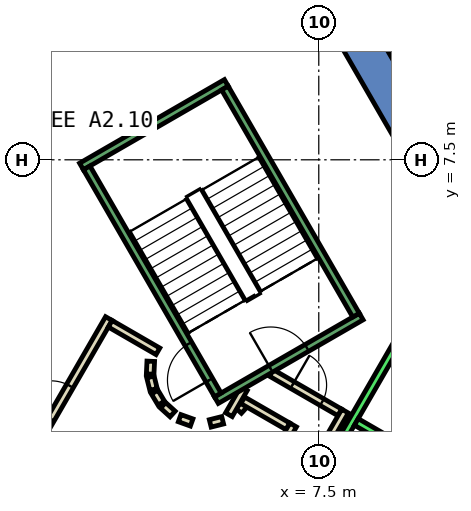
"""IFC4 building model, lengths in metres.
Left out: names, types, materials, properties, quantities, classifications, styles, units other than length and angle.
Written with IfcOpenShell. Run it as: python <this file> out.ifc"""

import sys

from ifc_helpers import new_model, si_unit, direction, frame, frame_2d, origin, place, context, subcontext, project, spatial, polyline, rectangle, outline, extrude, element, fill, save


model = new_model("IFC4")
c1 = context("Model", 3, precision=1e-05, world=origin(), true_north=direction((0.0, 1.0)))
c2 = subcontext(c1, "Body", "Model", "MODEL_VIEW")
j1 = project(units=[si_unit("LENGTHUNIT", "METRE"), si_unit("PLANEANGLEUNIT", "RADIAN")], contexts=[c1])
p1 = place(None, origin())
s1 = spatial("IfcSite", under=j1, at=p1, CompositionType="ELEMENT")
p2 = place(p1, origin())
s2 = spatial("IfcBuilding", under=s1, at=p2, CompositionType="ELEMENT")
p3 = place(p2, frame((0.0, 0.0, 35.0)))
s3 = spatial("IfcBuildingStorey", under=s2, at=p3, CompositionType="ELEMENT", Elevation=35.0)
p4 = place(p3, frame((0.0, 0.0, -0.6)))
e1 = element("IfcWall", 1, at=p4, inside=s3, PredefinedType="SHEAR", context=c2, shape_type="SweptSolid", body=[
    extrude(outline(polyline([(8.517, 11.748), (7.651, 11.248), (12.702, 2.5), (13.856, 2.5), (8.517, 11.748)])), origin(), (0.0, 0.0, 1.0), 4.4),
])
p5 = place(p3, frame((5.39, 0.898, 0.0), z_axis=(0.0, 0.0, 1.0), x_axis=(0.673828488714, 0.738887791073, 0.0)))
e2 = element("IfcWall", 2, at=p5, inside=s3, PredefinedType="PARTITIONING", context=c2, shape_type="SweptSolid", body=[
    extrude(rectangle(XDim=0.263, YDim=0.2, at=frame_2d((0.131, 0.0))), origin(), (0.0, 0.0, 1.0), 3.8),
])
p6 = place(p3, frame((5.499, 1.172, 0.0), z_axis=(0.0, 0.0, 1.0), x_axis=(0.866333505267, -0.499465972466, 0.0)))
e3 = element("IfcWall", 3, at=p6, inside=s3, PredefinedType="PARTITIONING", context=c2, shape_type="SweptSolid", body=[
    extrude(rectangle(XDim=1.374, YDim=0.2, at=frame_2d((0.687, 0.0))), origin(), (0.0, 0.0, 1.0), 3.8),
])
p7 = place(p3, frame((6.826, 0.522, 0.0), z_axis=(0.0, 0.0, 1.0), x_axis=(-0.500016722714, -0.866015748706, 0.0)))
e4 = element("IfcWall", 4, at=p7, inside=s3, PredefinedType="PARTITIONING", context=c2, shape_type="SweptSolid", body=[
    extrude(rectangle(XDim=1.7, YDim=0.2, at=frame_2d((0.85, 0.0))), origin(), (0.0, 0.0, 1.0), 3.8),
])
p8 = place(p3, frame((6.25, 1.894, 0.0), z_axis=(0.0, 0.0, 1.0), x_axis=(0.866043184279, -0.499969202016, 0.0)))
e5 = element("IfcWall", 5, at=p8, inside=s3, PredefinedType="PARTITIONING", context=c2, shape_type="SweptSolid", body=[
    extrude(rectangle(XDim=2.084, YDim=0.2, at=frame_2d((1.042, 0.0))), origin(), (0.0, 0.0, 1.0), 3.8),
])
p9 = place(p8, frame((0.642, 0.0, 0.0)))
e6 = element("IfcOpeningElement", 6, at=p9, cuts=e5, PredefinedType="OPENING", context=c2, shape_type="SweptSolid", body=[
    extrude(rectangle(XDim=0.9, YDim=2.1, at=frame_2d((0.45, 1.05))), frame((0.0, 0.11, 0.0), z_axis=(0.0, -1.0, 0.0), x_axis=(1.0, 0.0, 0.0)), (0.0, 0.0, 1.0), 0.22),
])
p10 = place(p3, frame((8.192, 0.888, 0.0), z_axis=(0.0, 0.0, 1.0), x_axis=(-0.499940625693, -0.866059680843, 0.0)))
e7 = element("IfcWall", 7, at=p10, inside=s3, PredefinedType="PARTITIONING", context=c2, shape_type="SweptSolid", body=[
    extrude(rectangle(XDim=2.68, YDim=0.2, at=frame_2d((1.34, 0.0))), origin(), (0.0, 0.0, 1.0), 3.8),
])
p11 = place(p3, frame((5.135, 0.793, 0.0), z_axis=(0.0, 0.0, 1.0), x_axis=(0.499526442893, 0.866298639529, 0.0)))
e8 = element("IfcWall", 8, at=p11, inside=s3, PredefinedType="PARTITIONING", context=c2, shape_type="SweptSolid", body=[
    extrude(rectangle(XDim=0.791, YDim=0.2, at=frame_2d((0.396, 0.0))), origin(), (0.0, 0.0, 1.0), 3.8),
])
p12 = place(p3, frame((-0.52, -1.0, 0.0), z_axis=(0.0, 0.0, 1.0), x_axis=(0.50011622646, 0.865958290007, 0.0)))
e9 = element("IfcWall", 9, at=p12, inside=s3, PredefinedType="PARTITIONING", context=c2, shape_type="SweptSolid", body=[
    extrude(rectangle(XDim=4.991, YDim=0.2, at=frame_2d((2.496, 0.0))), origin(), (0.0, 0.0, 1.0), 3.8),
])
p13 = place(p12, frame((1.945, 0.0, 0.0)))
e10 = element("IfcOpeningElement", 10, at=p13, cuts=e9, PredefinedType="OPENING", context=c2, shape_type="SweptSolid", body=[
    extrude(rectangle(XDim=1.0, YDim=2.1, at=frame_2d((0.5, 1.05))), frame((0.0, 0.11, 0.0), z_axis=(0.0, -1.0, 0.0), x_axis=(1.0, 0.0, 0.0)), (0.0, 0.0, 1.0), 0.22),
])
p14 = place(p3, frame((2.012, 3.186, 0.0), z_axis=(0.0, 0.0, 1.0), x_axis=(0.865891012941, -0.500232699559, 0.0)))
e11 = element("IfcWall", 11, at=p14, inside=s3, PredefinedType="PARTITIONING", context=c2, shape_type="SweptSolid", body=[
    extrude(rectangle(XDim=1.449, YDim=0.2, at=frame_2d((0.725, 0.0))), origin(), (0.0, 0.0, 1.0), 3.8),
])
p15 = place(p3, frame((3.079, 2.199, 0.0), z_axis=(0.0, 0.0, 1.0), x_axis=(-0.047771483479, -0.998858290933, 0.0)))
e12 = element("IfcWall", 12, at=p15, inside=s3, PredefinedType="PARTITIONING", context=c2, shape_type="SweptSolid", body=[
    extrude(rectangle(XDim=0.337, YDim=0.2, at=frame_2d((0.169, 0.0))), origin(), (0.0, 0.0, 1.0), 3.8),
])
p16 = place(p3, frame((3.07, 1.786, 0.0), z_axis=(0.0, 0.0, 1.0), x_axis=(0.242705583207, -0.970099994784, 0.0)))
e13 = element("IfcWall", 13, at=p16, inside=s3, PredefinedType="PARTITIONING", context=c2, shape_type="SweptSolid", body=[
    extrude(rectangle(XDim=0.338, YDim=0.2, at=frame_2d((0.169, 0.0))), origin(), (0.0, 0.0, 1.0), 3.8),
])
for number, where, z_axis, x_axis in (
    (14, (3.182, 1.388, 0.0), (0.0, 0.0, 1.0), (0.512, -0.859, 0.0)),
    (15, (3.404, 1.039, 0.0), (0.0, 0.0, 1.0), (0.74, -0.672, 0.0)),
):
    element("IfcWall", number, at=place(p3, frame(where, z_axis=z_axis, x_axis=x_axis)), inside=s3, PredefinedType="PARTITIONING", context=c2, shape_type="SweptSolid", body=[
        extrude(rectangle(XDim=0.338, YDim=0.2, at=frame_2d((0.169, 0.0))), origin(), (0.0, 0.0, 1.0), 3.8),
    ])
p17 = place(p3, frame((3.838, 0.702, 0.0), z_axis=(0.0, 0.0, 1.0), x_axis=(0.941035081519, -0.338308993895, 0.0)))
e16 = element("IfcWall", 16, at=p17, inside=s3, PredefinedType="PARTITIONING", context=c2, shape_type="SweptSolid", body=[
    extrude(rectangle(XDim=0.337, YDim=0.2, at=frame_2d((0.168, 0.0))), origin(), (0.0, 0.0, 1.0), 3.8),
])
p18 = place(p3, frame((4.644, 0.564, 0.0), z_axis=(0.0, 0.0, 1.0), x_axis=(0.969929076366, 0.243387729394, 0.0)))
e17 = element("IfcWall", 17, at=p18, inside=s3, PredefinedType="PARTITIONING", context=c2, shape_type="SweptSolid", body=[
    extrude(rectangle(XDim=0.337, YDim=0.2, at=frame_2d((0.168, 0.0))), origin(), (0.0, 0.0, 1.0), 3.8),
])
p19 = place(p3, frame((4.451, -6.19, 0.0), z_axis=(0.0, 0.0, 1.0), x_axis=(0.50000090737, 0.866024879913, 0.0)))
e18 = element("IfcWall", 18, at=p19, inside=s3, PredefinedType="STANDARD", context=c2, shape_type="SweptSolid", body=[
    extrude(rectangle(XDim=10.6, YDim=0.2, at=frame_2d((5.3, 0.0))), origin(), (0.0, 0.0, 1.0), 3.8),
])
p20 = place(p3, frame((8.488, 0.602, 0.0), z_axis=(0.0, 0.0, 1.0), x_axis=(0.866022959057, -0.500004234368, 0.0)))
e19 = element("IfcWall", 19, at=p20, inside=s3, PredefinedType="STANDARD", context=c2, shape_type="SweptSolid", body=[
    extrude(rectangle(XDim=2.5, YDim=0.2, at=frame_2d((1.25, 0.0))), origin(), (0.0, 0.0, 1.0), 3.8),
])
p21 = place(p3, frame((4.806, 1.176, 0.0), z_axis=(0.0, 0.0, 1.0), x_axis=(0.866059941101, 0.499940174841, 0.0)))
e20 = element("IfcWall", 20, at=p21, inside=s3, PredefinedType="STANDARD", context=c2, shape_type="SweptSolid", body=[
    extrude(rectangle(XDim=4.4, YDim=0.2, at=frame_2d((2.2, 0.0))), origin(), (0.0, 0.0, 1.0), 3.8),
])
p22 = place(p21, frame((1.65, 0.0, 0.0)))
e21 = element("IfcOpeningElement", 21, at=p22, cuts=e20, PredefinedType="OPENING", context=c2, shape_type="SweptSolid", body=[
    extrude(rectangle(XDim=1.1, YDim=2.2, at=frame_2d((0.55, 1.1))), frame((0.0, 0.11, 0.0), z_axis=(0.0, -1.0, 0.0), x_axis=(1.0, 0.0, 0.0)), (0.0, 0.0, 1.0), 0.22),
])
p23 = place(p3, frame((1.256, 7.324, 0.0), z_axis=(0.0, 0.0, 1.0), x_axis=(0.866046073146, 0.499964197906, 0.0)))
e22 = element("IfcWall", 22, at=p23, inside=s3, PredefinedType="STANDARD", context=c2, shape_type="SweptSolid", body=[
    extrude(rectangle(XDim=4.4, YDim=0.2, at=frame_2d((2.2, 0.0))), origin(), (0.0, 0.0, 1.0), 3.8),
])
p24 = place(p3, frame((4.843, 1.312, 0.0), z_axis=(0.0, 0.0, 1.0), x_axis=(-0.499963383562, 0.866046543262, 0.0)))
e23 = element("IfcWall", 23, at=p24, inside=s3, PredefinedType="STANDARD", context=c2, shape_type="SweptSolid", body=[
    extrude(rectangle(XDim=6.9, YDim=0.2, at=frame_2d((3.45, 0.0))), origin(), (0.0, 0.0, 1.0), 3.8),
])
p25 = place(p24, frame((0.45, 0.0, 0.0)))
e24 = element("IfcOpeningElement", 24, at=p25, cuts=e23, PredefinedType="OPENING", context=c2, shape_type="SweptSolid", body=[
    extrude(rectangle(XDim=1.1, YDim=2.2, at=frame_2d((0.55, 1.1))), frame((0.0, 0.11, 0.0), z_axis=(0.0, -1.0, 0.0), x_axis=(1.0, 0.0, 0.0)), (0.0, 0.0, 1.0), 0.22),
])
p26 = place(p3, frame((8.48, 3.412, 0.0), z_axis=(0.0, 0.0, 1.0), x_axis=(-0.499978703459, 0.866037698999, 0.0)))
e25 = element("IfcWall", 25, at=p26, inside=s3, PredefinedType="STANDARD", context=c2, shape_type="SweptSolid", body=[
    extrude(rectangle(XDim=6.9, YDim=0.2, at=frame_2d((3.45, 0.0))), origin(), (0.0, 0.0, 1.0), 3.8),
])
p27 = place(p13, origin())
e26 = element("IfcDoor", 26, at=p27, inside=s3, OperationType="SINGLE_SWING_LEFT", PredefinedType="DOOR", context=c2, shape_type="SweptSolid", body=[
    extrude(rectangle(XDim=1.0, YDim=2.1, at=frame_2d((0.5, 1.05))), frame((0.0, 0.025, 0.0), z_axis=(0.0, -1.0, 0.0), x_axis=(1.0, 0.0, 0.0)), (0.0, 0.0, 1.0), 0.05),
])
fill(e10, e26)
p28 = place(p9, origin())
e27 = element("IfcDoor", 27, at=p28, inside=s3, OperationType="SINGLE_SWING_LEFT", PredefinedType="DOOR", context=c2, shape_type="SweptSolid", body=[
    extrude(rectangle(XDim=0.9, YDim=2.1, at=frame_2d((0.45, 1.05))), frame((0.0, 0.025, 0.0), z_axis=(0.0, -1.0, 0.0), x_axis=(1.0, 0.0, 0.0)), (0.0, 0.0, 1.0), 0.05),
])
fill(e6, e27)
p29 = place(p25, origin())
e28 = element("IfcDoor", 28, at=p29, inside=s3, OperationType="SINGLE_SWING_LEFT", PredefinedType="DOOR", context=c2, shape_type="SweptSolid", body=[
    extrude(rectangle(XDim=1.1, YDim=2.2, at=frame_2d((0.55, 1.1))), frame((0.0, 0.025, 0.0), z_axis=(0.0, -1.0, 0.0), x_axis=(1.0, 0.0, 0.0)), (0.0, 0.0, 1.0), 0.05),
])
fill(e24, e28)
p30 = place(p22, origin())
e29 = element("IfcDoor", 29, at=p30, inside=s3, OperationType="SINGLE_SWING_LEFT", PredefinedType="DOOR", context=c2, shape_type="SweptSolid", body=[
    extrude(rectangle(XDim=1.1, YDim=2.2, at=frame_2d((0.55, 1.1))), frame((0.0, 0.025, 0.0), z_axis=(0.0, -1.0, 0.0), x_axis=(1.0, 0.0, 0.0)), (0.0, 0.0, 1.0), 0.05),
])
fill(e21, e29)
save(model, sys.argv[1])
